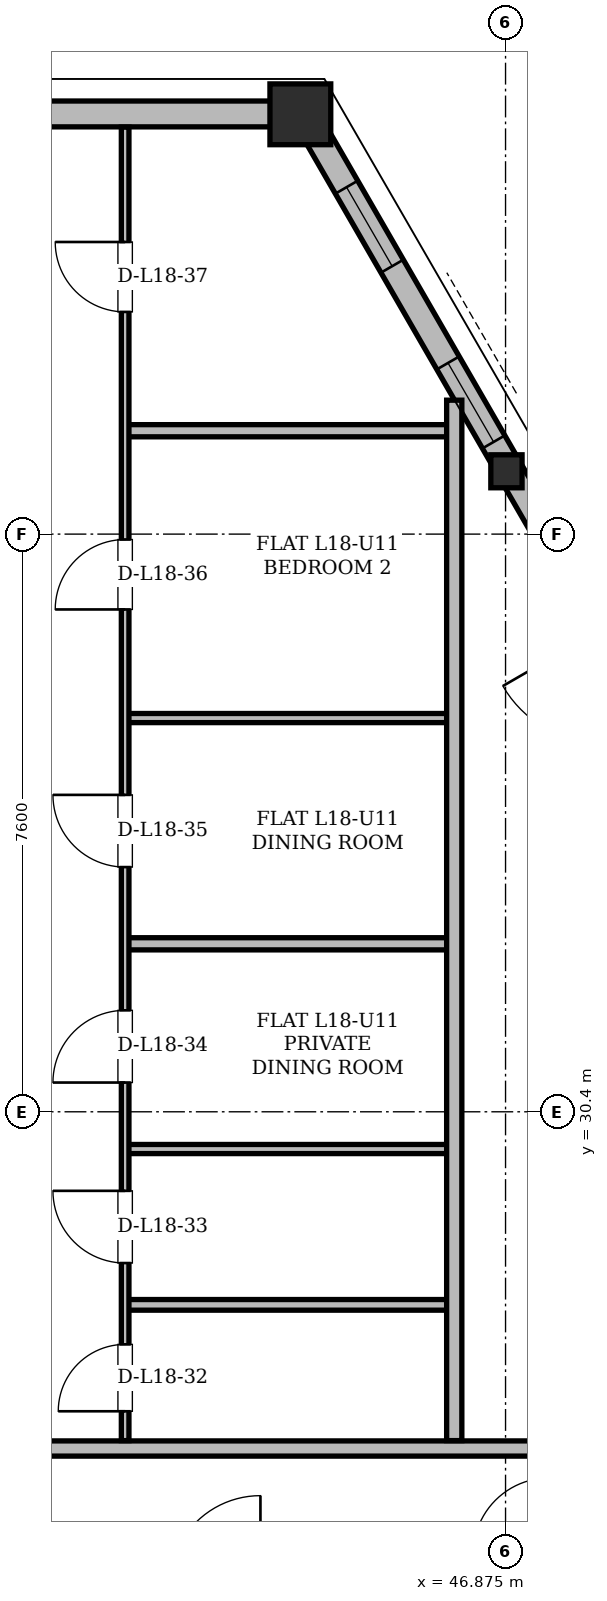
"""IFC4 building model, lengths in metres.
Left out: names, types, materials, properties, quantities, classifications, styles, units other than length and angle.
Written with IfcOpenShell. Run it as: python <this file> out.ifc"""

import sys

from ifc_helpers import new_model, si_unit, direction, frame, frame_2d, origin, origin_2d, place, context, subcontext, project, spatial, rectangle, hollow_rectangle, i_section, extrude, element, fill, save


model = new_model("IFC4")
c1 = context("Model", 3, precision=1e-05, world=origin(), true_north=direction((0.0, 1.0)))
c2 = subcontext(c1, "Body", "Model", "MODEL_VIEW")
j1 = project(units=[si_unit("LENGTHUNIT", "METRE"), si_unit("PLANEANGLEUNIT", "RADIAN")], contexts=[c1])
p1 = place(None, origin())
s1 = spatial("IfcSite", under=j1, at=p1, CompositionType="ELEMENT")
p2 = place(p1, origin())
s2 = spatial("IfcBuilding", under=s1, at=p2, CompositionType="ELEMENT")
p3 = place(p2, frame((0.0, 0.0, 70.5)))
s3 = spatial("IfcBuildingStorey", under=s2, at=p3, CompositionType="ELEMENT", Elevation=70.5)
p4 = place(p3, frame((44.227, 43.528, 0.004), z_axis=(-0.028678016801, -0.002650338046, 0.999585187496), x_axis=(0.092024908784, -0.995756705307, 0.0)))
e1 = element("IfcColumn", 1, at=p4, inside=s3, PredefinedType="COLUMN", context=c2, shape_type="SweptSolid", body=[
    extrude(hollow_rectangle(XDim=0.8, YDim=0.8, WallThickness=0.065, at=origin_2d()), origin(), (0.0, 0.0, 1.0), 3.593),
])
p5 = place(p3, frame((46.935, 38.837, 0.004), z_axis=(-0.026708337266, -0.005912532677, 0.99962578332), x_axis=(0.216141230312, -0.976362109342, 0.0)))
e2 = element("IfcColumn", 2, at=p5, inside=s3, PredefinedType="COLUMN", context=c2, shape_type="SweptSolid", body=[
    extrude(i_section(OverallWidth=0.411, OverallDepth=0.434, WebThickness=0.036, FlangeThickness=0.057, at=origin_2d()), origin(), (0.0, 0.0, 1.0), 3.593),
])
p6 = place(p3, frame((51.715, 30.558, 0.0), z_axis=(0.0, 0.0, 1.0), x_axis=(-0.499992928635, 0.8660294864, 0.0)))
e3 = element("IfcWall", 3, at=p6, inside=s3, PredefinedType="SOLIDWALL", context=c2, shape_type="SweptSolid", body=[
    extrude(rectangle(XDim=14.976, YDim=0.34, at=frame_2d((7.488, 0.0))), origin(), (0.0, 0.0, 1.0), 2.494),
])
p7 = place(p6, frame((5.651, 0.0, 0.0)))
e4 = element("IfcOpeningElement", 4, at=p7, cuts=e3, PredefinedType="OPENING", context=c2, shape_type="SweptSolid", body=[
    extrude(rectangle(XDim=1.5, YDim=2.2, at=frame_2d((0.75, 1.1))), frame((0.0, 0.17, 0.0), z_axis=(0.0, -1.0, 0.0), x_axis=(1.0, 0.0, 0.0)), (0.0, 0.0, 1.0), 0.34),
])
p8 = place(p6, frame((12.663, 0.0, 0.85)))
e5 = element("IfcOpeningElement", 5, at=p8, cuts=e3, PredefinedType="OPENING", context=c2, shape_type="SweptSolid", body=[
    extrude(rectangle(XDim=1.2, YDim=1.48, at=frame_2d((0.6, 0.74))), frame((0.0, 0.17, 0.0), z_axis=(0.0, -1.0, 0.0), x_axis=(1.0, 0.0, 0.0)), (0.0, 0.0, 1.0), 0.34),
])
p9 = place(p6, frame((2.642, 0.0, 0.85)))
e6 = element("IfcOpeningElement", 6, at=p9, cuts=e3, PredefinedType="OPENING", context=c2, shape_type="SweptSolid", body=[
    extrude(rectangle(XDim=1.2, YDim=1.48, at=frame_2d((0.6, 0.74))), frame((0.0, 0.17, 0.0), z_axis=(0.0, -1.0, 0.0), x_axis=(1.0, 0.0, 0.0)), (0.0, 0.0, 1.0), 0.34),
])
p10 = place(p6, frame((9.993, 0.0, 0.85)))
e7 = element("IfcOpeningElement", 7, at=p10, cuts=e3, PredefinedType="OPENING", context=c2, shape_type="SweptSolid", body=[
    extrude(rectangle(XDim=1.2, YDim=1.48, at=frame_2d((0.6, 0.74))), frame((0.0, 0.17, 0.0), z_axis=(0.0, -1.0, 0.0), x_axis=(1.0, 0.0, 0.0)), (0.0, 0.0, 1.0), 0.34),
])
p11 = place(p3, frame((44.227, 43.528, 0.0), z_axis=(0.0, 0.0, 1.0), x_axis=(-1.0, 0.0, 0.0)))
e8 = element("IfcWall", 8, at=p11, inside=s3, PredefinedType="SOLIDWALL", context=c2, shape_type="SweptSolid", body=[
    extrude(rectangle(XDim=13.454, YDim=0.34, at=frame_2d((6.727, 0.0))), origin(), (0.0, 0.0, 1.0), 2.494),
])
p12 = place(p11, frame((3.875, 0.0, 0.52)))
e9 = element("IfcOpeningElement", 9, at=p12, cuts=e8, PredefinedType="OPENING", context=c2, shape_type="SweptSolid", body=[
    extrude(rectangle(XDim=0.85, YDim=0.92, at=frame_2d((0.425, 0.46))), frame((0.0, 0.17, 0.0), z_axis=(0.0, -1.0, 0.0), x_axis=(1.0, 0.0, 0.0)), (0.0, 0.0, 1.0), 0.34),
])
p13 = place(p3, frame((27.55, 25.97, 0.0), z_axis=(0.0, 0.0, 1.0), x_axis=(1.0, 0.0, 0.0)))
e10 = element("IfcWall", 10, at=p13, inside=s3, PredefinedType="PARTITIONING", context=c2, shape_type="SweptSolid", body=[
    extrude(rectangle(XDim=19.9, YDim=0.2, at=frame_2d((9.95, 0.0))), origin(), (0.0, 0.0, 1.0), 2.738),
])
p14 = place(p13, frame((0.425, 0.0, 0.0)))
e11 = element("IfcOpeningElement", 11, at=p14, cuts=e10, PredefinedType="OPENING", context=c2, shape_type="SweptSolid", body=[
    extrude(rectangle(XDim=1.0, YDim=2.18, at=frame_2d((0.5, 1.09))), frame((0.0, 0.1, 0.0), z_axis=(0.0, -1.0, 0.0), x_axis=(1.0, 0.0, 0.0)), (0.0, 0.0, 1.0), 0.2),
])
p15 = place(p13, frame((4.347, 0.0, 0.0)))
e12 = element("IfcOpeningElement", 12, at=p15, cuts=e10, PredefinedType="OPENING", context=c2, shape_type="SweptSolid", body=[
    extrude(rectangle(XDim=1.0, YDim=2.18, at=frame_2d((0.5, 1.09))), frame((0.0, 0.1, 0.0), z_axis=(0.0, -1.0, 0.0), x_axis=(1.0, 0.0, 0.0)), (0.0, 0.0, 1.0), 0.2),
])
p16 = place(p13, frame((12.208, 0.0, 0.0)))
e13 = element("IfcOpeningElement", 13, at=p16, cuts=e10, PredefinedType="OPENING", context=c2, shape_type="SweptSolid", body=[
    extrude(rectangle(XDim=1.0, YDim=2.18, at=frame_2d((0.5, 1.09))), frame((0.0, 0.1, 0.0), z_axis=(0.0, -1.0, 0.0), x_axis=(1.0, 0.0, 0.0)), (0.0, 0.0, 1.0), 0.2),
])
p17 = place(p3, frame((41.87, 27.86, 0.0), z_axis=(0.0, 0.0, 1.0), x_axis=(1.0, 0.0, 0.0)))
e14 = element("IfcWall", 14, at=p17, inside=s3, PredefinedType="PARTITIONING", context=c2, shape_type="SweptSolid", body=[
    extrude(rectangle(XDim=4.38, YDim=0.14, at=frame_2d((2.19, 0.0))), origin(), (0.0, 0.0, 1.0), 2.738),
])
p18 = place(p3, frame((41.87, 29.91, 0.0), z_axis=(0.0, 0.0, 1.0), x_axis=(1.0, 0.0, 0.0)))
e15 = element("IfcWall", 15, at=p18, inside=s3, PredefinedType="PARTITIONING", context=c2, shape_type="SweptSolid", body=[
    extrude(rectangle(XDim=4.38, YDim=0.12, at=frame_2d((2.19, 0.0))), origin(), (0.0, 0.0, 1.0), 2.738),
])
p19 = place(p3, frame((41.87, 32.61, 0.0), z_axis=(0.0, 0.0, 1.0), x_axis=(1.0, 0.0, 0.0)))
e16 = element("IfcWall", 16, at=p19, inside=s3, PredefinedType="PARTITIONING", context=c2, shape_type="SweptSolid", body=[
    extrude(rectangle(XDim=4.38, YDim=0.16, at=frame_2d((2.19, 0.0))), origin(), (0.0, 0.0, 1.0), 2.738),
])
p20 = place(p3, frame((41.87, 35.58, 0.0), z_axis=(0.0, 0.0, 1.0), x_axis=(1.0, 0.0, 0.0)))
e17 = element("IfcWall", 17, at=p20, inside=s3, PredefinedType="PARTITIONING", context=c2, shape_type="SweptSolid", body=[
    extrude(rectangle(XDim=4.38, YDim=0.12, at=frame_2d((2.19, 0.0))), origin(), (0.0, 0.0, 1.0), 2.738),
])
p21 = place(p3, frame((41.87, 39.36, 0.0), z_axis=(0.0, 0.0, 1.0), x_axis=(1.0, 0.0, 0.0)))
e18 = element("IfcWall", 18, at=p21, inside=s3, PredefinedType="PARTITIONING", context=c2, shape_type="SweptSolid", body=[
    extrude(rectangle(XDim=4.38, YDim=0.16, at=frame_2d((2.19, 0.0))), origin(), (0.0, 0.0, 1.0), 2.738),
])
p22 = place(p3, frame((41.87, 26.074, 0.0), z_axis=(0.0, 0.0, 1.0), x_axis=(0.0, 1.0, 0.0)))
e19 = element("IfcWall", 19, at=p22, inside=s3, PredefinedType="PARTITIONING", context=c2, shape_type="SweptSolid", body=[
    extrude(rectangle(XDim=17.28, YDim=0.1, at=frame_2d((8.64, 0.0))), origin(), (0.0, 0.0, 1.0), 3.36),
])
p23 = place(p22, frame((0.386, 0.0, 0.0)))
e20 = element("IfcOpeningElement", 20, at=p23, cuts=e19, PredefinedType="OPENING", context=c2, shape_type="SweptSolid", body=[
    extrude(rectangle(XDim=0.88, YDim=2.08, at=frame_2d((0.44, 1.04))), frame((0.0, 0.05, 0.0), z_axis=(0.0, -1.0, 0.0), x_axis=(1.0, 0.0, 0.0)), (0.0, 0.0, 1.0), 0.1),
])
p24 = place(p22, frame((2.336, 0.0, 0.0)))
e21 = element("IfcOpeningElement", 21, at=p24, cuts=e19, PredefinedType="OPENING", context=c2, shape_type="SweptSolid", body=[
    extrude(rectangle(XDim=0.95, YDim=2.1, at=frame_2d((0.475, 1.05))), frame((0.0, 0.05, 0.0), z_axis=(0.0, -1.0, 0.0), x_axis=(1.0, 0.0, 0.0)), (0.0, 0.0, 1.0), 0.1),
])
p25 = place(p22, frame((4.711, 0.0, 0.0)))
e22 = element("IfcOpeningElement", 22, at=p25, cuts=e19, PredefinedType="OPENING", context=c2, shape_type="SweptSolid", body=[
    extrude(rectangle(XDim=0.95, YDim=2.1, at=frame_2d((0.475, 1.05))), frame((0.0, 0.05, 0.0), z_axis=(0.0, -1.0, 0.0), x_axis=(1.0, 0.0, 0.0)), (0.0, 0.0, 1.0), 0.1),
])
p26 = place(p22, frame((7.545, 0.0, 0.0)))
e23 = element("IfcOpeningElement", 23, at=p26, cuts=e19, PredefinedType="OPENING", context=c2, shape_type="SweptSolid", body=[
    extrude(rectangle(XDim=0.95, YDim=2.1, at=frame_2d((0.475, 1.05))), frame((0.0, 0.05, 0.0), z_axis=(0.0, -1.0, 0.0), x_axis=(1.0, 0.0, 0.0)), (0.0, 0.0, 1.0), 0.1),
])
p27 = place(p22, frame((10.935, 0.0, 0.0)))
e24 = element("IfcOpeningElement", 24, at=p27, cuts=e19, PredefinedType="OPENING", context=c2, shape_type="SweptSolid", body=[
    extrude(rectangle(XDim=0.92, YDim=2.12, at=frame_2d((0.46, 1.06))), frame((0.0, 0.05, 0.0), z_axis=(0.0, -1.0, 0.0), x_axis=(1.0, 0.0, 0.0)), (0.0, 0.0, 1.0), 0.1),
])
p28 = place(p22, frame((14.849, 0.0, 0.0)))
e25 = element("IfcOpeningElement", 25, at=p28, cuts=e19, PredefinedType="OPENING", context=c2, shape_type="SweptSolid", body=[
    extrude(rectangle(XDim=0.92, YDim=2.12, at=frame_2d((0.46, 1.06))), frame((0.0, 0.05, 0.0), z_axis=(0.0, -1.0, 0.0), x_axis=(1.0, 0.0, 0.0)), (0.0, 0.0, 1.0), 0.1),
])
p29 = place(p3, frame((46.2, 26.074, 0.0), z_axis=(0.0, 0.0, 1.0), x_axis=(0.0, 1.0, 0.0)))
e26 = element("IfcWall", 26, at=p29, inside=s3, PredefinedType="PARTITIONING", context=c2, shape_type="SweptSolid", body=[
    extrude(rectangle(XDim=13.688, YDim=0.2, at=frame_2d((6.844, 0.0))), origin(), (0.0, 0.0, 1.0), 2.494),
])
p30 = place(p8, origin())
e27 = element("IfcWindow", 27, at=p30, inside=s3, PartitioningType="SINGLE_PANEL", PredefinedType="WINDOW", context=c2, shape_type="SweptSolid", body=[
    extrude(rectangle(XDim=1.2, YDim=1.48, at=frame_2d((0.6, 0.74))), frame((0.0, 0.03, 0.0), z_axis=(0.0, -1.0, 0.0), x_axis=(1.0, 0.0, 0.0)), (0.0, 0.0, 1.0), 0.06),
])
fill(e5, e27)
p31 = place(p10, origin())
e28 = element("IfcWindow", 28, at=p31, inside=s3, PartitioningType="SINGLE_PANEL", PredefinedType="WINDOW", context=c2, shape_type="SweptSolid", body=[
    extrude(rectangle(XDim=1.2, YDim=1.48, at=frame_2d((0.6, 0.74))), frame((0.0, 0.03, 0.0), z_axis=(0.0, -1.0, 0.0), x_axis=(1.0, 0.0, 0.0)), (0.0, 0.0, 1.0), 0.06),
])
fill(e7, e28)
p32 = place(p23, origin())
e29 = element("IfcDoor", 29, at=p32, inside=s3, OperationType="SINGLE_SWING_LEFT", PredefinedType="DOOR", context=c2, shape_type="SweptSolid", body=[
    extrude(rectangle(XDim=0.88, YDim=2.08, at=frame_2d((0.44, 1.04))), frame((0.0, 0.025, 0.0), z_axis=(0.0, -1.0, 0.0), x_axis=(1.0, 0.0, 0.0)), (0.0, 0.0, 1.0), 0.05),
])
fill(e20, e29)
p33 = place(p24, origin())
e30 = element("IfcDoor", 30, at=p33, inside=s3, OperationType="SINGLE_SWING_RIGHT", PredefinedType="DOOR", context=c2, shape_type="SweptSolid", body=[
    extrude(rectangle(XDim=0.95, YDim=2.1, at=frame_2d((0.475, 1.05))), frame((0.0, 0.025, 0.0), z_axis=(0.0, -1.0, 0.0), x_axis=(1.0, 0.0, 0.0)), (0.0, 0.0, 1.0), 0.05),
])
fill(e21, e30)
p34 = place(p25, origin())
e31 = element("IfcDoor", 31, at=p34, inside=s3, OperationType="SINGLE_SWING_LEFT", PredefinedType="DOOR", context=c2, shape_type="SweptSolid", body=[
    extrude(rectangle(XDim=0.95, YDim=2.1, at=frame_2d((0.475, 1.05))), frame((0.0, 0.025, 0.0), z_axis=(0.0, -1.0, 0.0), x_axis=(1.0, 0.0, 0.0)), (0.0, 0.0, 1.0), 0.05),
])
fill(e22, e31)
p35 = place(p26, origin())
e32 = element("IfcDoor", 32, at=p35, inside=s3, OperationType="SINGLE_SWING_RIGHT", PredefinedType="DOOR", context=c2, shape_type="SweptSolid", body=[
    extrude(rectangle(XDim=0.95, YDim=2.1, at=frame_2d((0.475, 1.05))), frame((0.0, 0.025, 0.0), z_axis=(0.0, -1.0, 0.0), x_axis=(1.0, 0.0, 0.0)), (0.0, 0.0, 1.0), 0.05),
])
fill(e23, e32)
p36 = place(p27, origin())
e33 = element("IfcDoor", 33, at=p36, inside=s3, OperationType="SINGLE_SWING_LEFT", PredefinedType="DOOR", context=c2, shape_type="SweptSolid", body=[
    extrude(rectangle(XDim=0.92, YDim=2.12, at=frame_2d((0.46, 1.06))), frame((0.0, 0.025, 0.0), z_axis=(0.0, -1.0, 0.0), x_axis=(1.0, 0.0, 0.0)), (0.0, 0.0, 1.0), 0.05),
])
fill(e24, e33)
p37 = place(p28, origin())
e34 = element("IfcDoor", 34, at=p37, inside=s3, OperationType="SINGLE_SWING_RIGHT", PredefinedType="DOOR", context=c2, shape_type="SweptSolid", body=[
    extrude(rectangle(XDim=0.92, YDim=2.12, at=frame_2d((0.46, 1.06))), frame((0.0, 0.025, 0.0), z_axis=(0.0, -1.0, 0.0), x_axis=(1.0, 0.0, 0.0)), (0.0, 0.0, 1.0), 0.05),
])
fill(e25, e34)
save(model, sys.argv[1])
